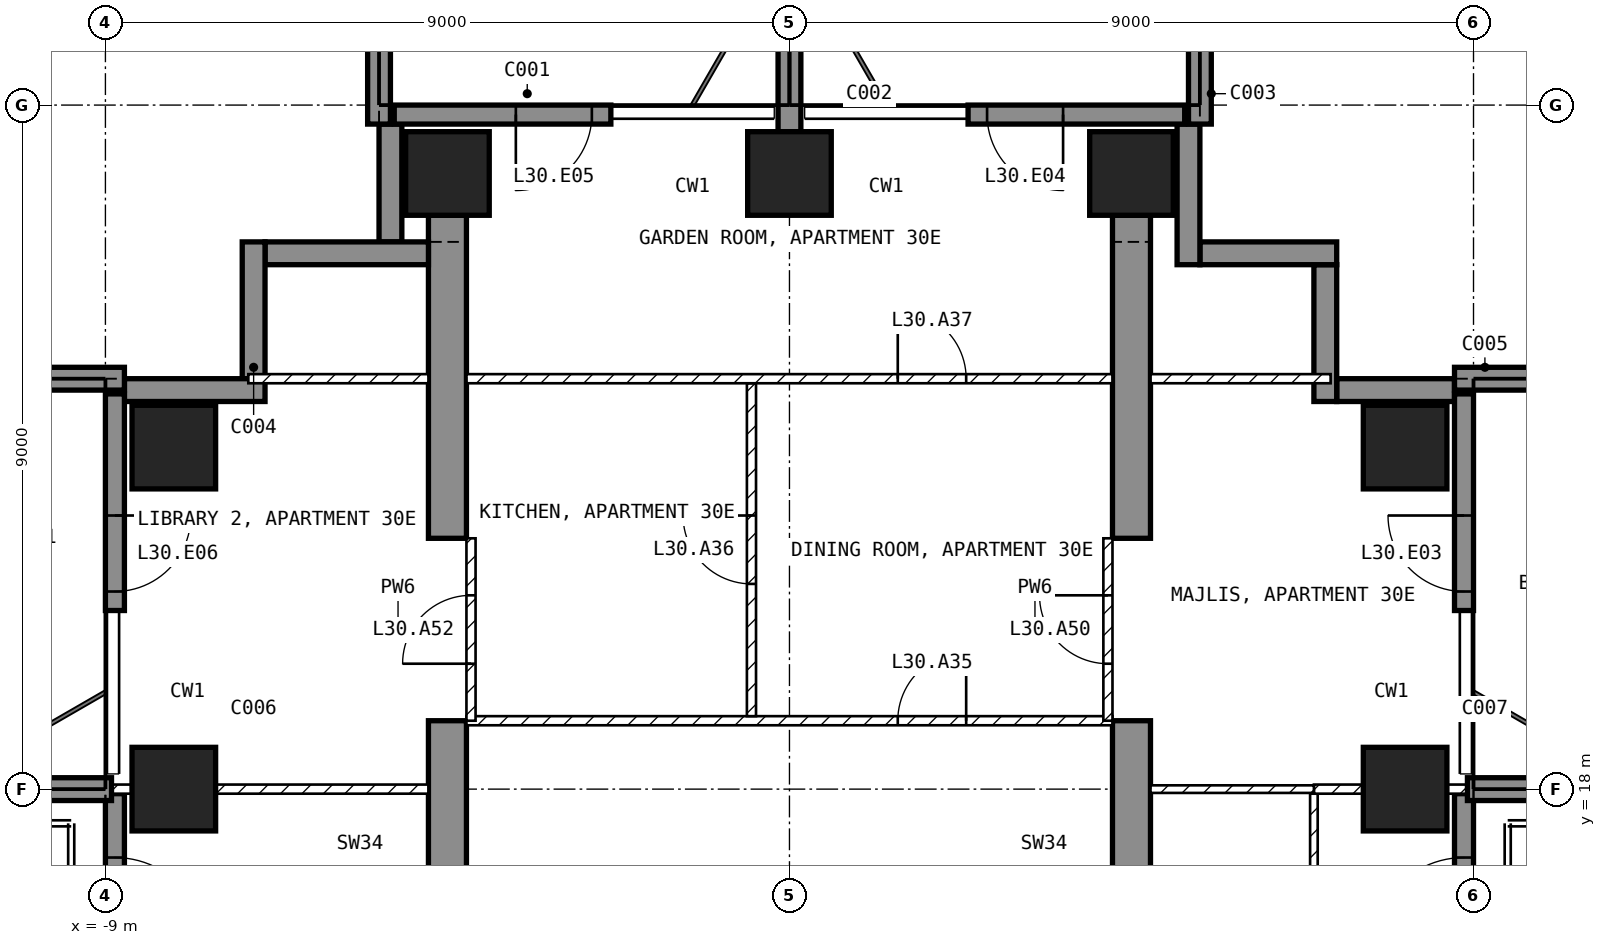
"""IFC4 building model, lengths in metres.
Left out: names, types, materials, properties, quantities, classifications, styles, units other than length and angle.
Written with IfcOpenShell. Run it as: python <this file> out.ifc"""

import sys

from ifc_helpers import new_model, si_unit, direction, frame, frame_2d, origin, origin_2d, place, context, subcontext, project, spatial, polyline, rectangle, outline, extrude, element, fill, save


model = new_model("IFC4")
c1 = context("Model", 3, precision=1e-05, world=origin(), true_north=direction((0.0, 1.0)))
c2 = subcontext(c1, "Body", "Model", "MODEL_VIEW")
j1 = project(units=[si_unit("LENGTHUNIT", "METRE"), si_unit("PLANEANGLEUNIT", "RADIAN")], contexts=[c1])
p1 = place(None, origin())
s1 = spatial("IfcSite", under=j1, at=p1, CompositionType="ELEMENT")
p2 = place(p1, origin())
s2 = spatial("IfcBuilding", under=s1, at=p2, CompositionType="ELEMENT")
p3 = place(p2, frame((0.0, 0.0, 126.9)))
s3 = spatial("IfcBuildingStorey", under=s2, at=p3, CompositionType="ELEMENT", Elevation=126.9)
for number, where, z_axis, x_axis in (
    (1, (-8.1, 18.0, -0.25), (0.0, 0.0, 1.0), (1.0, 0.0, 0.0)),
    (2, (-8.1, 22.5, -0.25), (0.0, 0.0, 1.0), (1.0, 0.0, 0.0)),
    (3, (-4.5, 26.1, -0.25), (0.0, 0.0, 1.0), (1.0, 0.0, 0.0)),
    (4, (0.0, 26.1, -0.25), (0.0, 0.0, 1.0), (1.0, 0.0, 0.0)),
    (5, (4.5, 26.1, -0.25), (0.0, 0.0, 1.0), (1.0, 0.0, 0.0)),
    (6, (8.1, 18.0, -0.25), (0.0, 0.0, 1.0), (1.0, 0.0, 0.0)),
    (7, (8.1, 22.5, -0.25), (0.0, 0.0, 1.0), (1.0, 0.0, 0.0)),
):
    element("IfcColumn", number, at=place(p3, frame(where, z_axis=z_axis, x_axis=x_axis)), inside=s3, PredefinedType="COLUMN", context=c2, shape_type="SweptSolid", body=[
        extrude(rectangle(XDim=1.1, YDim=1.1, at=origin_2d()), origin(), (0.0, 0.0, 1.0), 3.5),
    ])
for number, where, z_axis, x_axis in (
    (8, (-4.75, 9.0, -0.25), (1.0, 0.0, 0.0), (0.0, 1.0, 0.0)),
    (9, (4.25, 9.0, -0.25), (1.0, 0.0, 0.0), (0.0, 1.0, 0.0)),
):
    element("IfcWall", number, at=place(p3, frame(where, z_axis=z_axis, x_axis=x_axis)), inside=s3, PredefinedType="SHEAR", context=c2, shape_type="SweptSolid", body=[
        extrude(outline(polyline([(0.0, 0.0), (2.1, 0.0), (2.1, 2.65), (4.5, 2.65), (4.5, 0.0), (9.9, 0.0), (9.9, 2.65), (12.3, 2.65), (12.3, 0.0), (16.55, 0.0), (16.55, 3.5), (0.0, 3.5), (0.0, 0.0)])), origin(), (0.0, 0.0, 1.0), 0.5),
    ])
p4 = place(p3, frame((8.875, 15.65, 0.0), z_axis=(0.0, 0.0, 1.0), x_axis=(0.0, 1.0, 0.0)))
e10 = element("IfcWall", 10, at=p4, inside=s3, PredefinedType="SOLIDWALL", context=c2, shape_type="SweptSolid", body=[
    extrude(rectangle(XDim=2.29, YDim=0.25, at=frame_2d((1.145, 0.0))), origin(), (0.0, 0.0, 1.0), 3.25),
])
p5 = place(p4, frame((0.25, 0.0, 0.0)))
e11 = element("IfcOpeningElement", 11, at=p5, cuts=e10, PredefinedType="OPENING", context=c2, shape_type="SweptSolid", body=[
    extrude(rectangle(XDim=1.2, YDim=2.4, at=frame_2d((0.6, 1.2))), frame((0.0, 0.135, 0.0), z_axis=(0.0, -1.0, 0.0), x_axis=(1.0, 0.0, 0.0)), (0.0, 0.0, 1.0), 0.27),
])
p6 = place(p3, frame((8.875, 20.35, 0.0), z_axis=(0.0, 0.0, 1.0), x_axis=(0.0, 1.0, 0.0)))
e12 = element("IfcWall", 12, at=p6, inside=s3, PredefinedType="SOLIDWALL", context=c2, shape_type="SweptSolid", body=[
    extrude(rectangle(XDim=2.85, YDim=0.25, at=frame_2d((1.425, 0.0))), origin(), (0.0, 0.0, 1.0), 3.25),
])
p7 = place(p6, frame((0.25, 0.0, 0.0)))
e13 = element("IfcOpeningElement", 13, at=p7, cuts=e12, PredefinedType="OPENING", context=c2, shape_type="SweptSolid", body=[
    extrude(rectangle(XDim=1.0, YDim=2.4, at=frame_2d((0.5, 1.2))), frame((0.0, 0.135, 0.0), z_axis=(0.0, -1.0, 0.0), x_axis=(1.0, 0.0, 0.0)), (0.0, 0.0, 1.0), 0.27),
])
p8 = place(p3, frame((5.2, 26.875, 0.0), z_axis=(0.0, 0.0, 1.0), x_axis=(-1.0, 0.0, 0.0)))
e14 = element("IfcWall", 14, at=p8, inside=s3, PredefinedType="SOLIDWALL", context=c2, shape_type="SweptSolid", body=[
    extrude(rectangle(XDim=2.85, YDim=0.25, at=frame_2d((1.425, 0.0))), origin(), (0.0, 0.0, 1.0), 3.25),
])
p9 = place(p8, frame((1.6, 0.0, 0.0)))
e15 = element("IfcOpeningElement", 15, at=p9, cuts=e14, PredefinedType="OPENING", context=c2, shape_type="SweptSolid", body=[
    extrude(rectangle(XDim=1.0, YDim=2.4, at=frame_2d((0.5, 1.2))), frame((0.0, 0.135, 0.0), z_axis=(0.0, -1.0, 0.0), x_axis=(1.0, 0.0, 0.0)), (0.0, 0.0, 1.0), 0.27),
])
p10 = place(p3, frame((-2.35, 26.875, 0.0), z_axis=(0.0, 0.0, 1.0), x_axis=(-1.0, 0.0, 0.0)))
e16 = element("IfcWall", 16, at=p10, inside=s3, PredefinedType="SOLIDWALL", context=c2, shape_type="SweptSolid", body=[
    extrude(rectangle(XDim=2.85, YDim=0.25, at=frame_2d((1.425, 0.0))), origin(), (0.0, 0.0, 1.0), 3.25),
])
p11 = place(p10, frame((0.25, 0.0, 0.0)))
e17 = element("IfcOpeningElement", 17, at=p11, cuts=e16, PredefinedType="OPENING", context=c2, shape_type="SweptSolid", body=[
    extrude(rectangle(XDim=1.0, YDim=2.4, at=frame_2d((0.5, 1.2))), frame((0.0, 0.135, 0.0), z_axis=(0.0, -1.0, 0.0), x_axis=(1.0, 0.0, 0.0)), (0.0, 0.0, 1.0), 0.27),
])
p12 = place(p3, frame((-8.875, 23.2, 0.0), z_axis=(0.0, 0.0, 1.0), x_axis=(0.0, -1.0, 0.0)))
e18 = element("IfcWall", 18, at=p12, inside=s3, PredefinedType="SOLIDWALL", context=c2, shape_type="SweptSolid", body=[
    extrude(rectangle(XDim=2.85, YDim=0.25, at=frame_2d((1.425, 0.0))), origin(), (0.0, 0.0, 1.0), 3.25),
])
p13 = place(p12, frame((1.6, 0.0, 0.0)))
e19 = element("IfcOpeningElement", 19, at=p13, cuts=e18, PredefinedType="OPENING", context=c2, shape_type="SweptSolid", body=[
    extrude(rectangle(XDim=1.0, YDim=2.4, at=frame_2d((0.5, 1.2))), frame((0.0, 0.135, 0.0), z_axis=(0.0, -1.0, 0.0), x_axis=(1.0, 0.0, 0.0)), (0.0, 0.0, 1.0), 0.27),
])
p14 = place(p3, frame((-8.875, 17.94, 0.0), z_axis=(0.0, 0.0, 1.0), x_axis=(0.0, -1.0, 0.0)))
e20 = element("IfcWall", 20, at=p14, inside=s3, PredefinedType="SOLIDWALL", context=c2, shape_type="SweptSolid", body=[
    extrude(rectangle(XDim=2.29, YDim=0.25, at=frame_2d((1.145, 0.0))), origin(), (0.0, 0.0, 1.0), 3.25),
])
p15 = place(p14, frame((0.84, 0.0, 0.0)))
e21 = element("IfcOpeningElement", 21, at=p15, cuts=e20, PredefinedType="OPENING", context=c2, shape_type="SweptSolid", body=[
    extrude(rectangle(XDim=1.2, YDim=2.4, at=frame_2d((0.6, 1.2))), frame((0.0, 0.135, 0.0), z_axis=(0.0, -1.0, 0.0), x_axis=(1.0, 0.0, 0.0)), (0.0, 0.0, 1.0), 0.27),
])
p16 = place(p3, frame((8.75, 23.25, 0.0), z_axis=(0.0, 0.0, 1.0), x_axis=(-1.0, 0.0, 0.0)))
e22 = element("IfcWall", 22, at=p16, inside=s3, PredefinedType="SOLIDWALL", context=c2, shape_type="SweptSolid", body=[
    extrude(rectangle(XDim=1.55, YDim=0.3, at=frame_2d((0.775, 0.0))), origin(), (0.0, 0.0, 1.0), 3.25),
])
p17 = place(p3, frame((7.05, 23.1, 0.0), z_axis=(0.0, 0.0, 1.0), x_axis=(0.0, 1.0, 0.0)))
e23 = element("IfcWall", 23, at=p17, inside=s3, PredefinedType="SOLIDWALL", context=c2, shape_type="SweptSolid", body=[
    extrude(rectangle(XDim=1.8, YDim=0.3, at=frame_2d((0.9, 0.0))), origin(), (0.0, 0.0, 1.0), 3.25),
])
p18 = place(p3, frame((7.2, 25.05, 0.0), z_axis=(0.0, 0.0, 1.0), x_axis=(-1.0, 0.0, 0.0)))
e24 = element("IfcWall", 24, at=p18, inside=s3, PredefinedType="SOLIDWALL", context=c2, shape_type="SweptSolid", body=[
    extrude(rectangle(XDim=1.8, YDim=0.3, at=frame_2d((0.9, 0.0))), origin(), (0.0, 0.0, 1.0), 3.25),
])
p19 = place(p3, frame((5.25, 24.9, 0.0), z_axis=(0.0, 0.0, 1.0), x_axis=(0.0, 1.0, 0.0)))
e25 = element("IfcWall", 25, at=p19, inside=s3, PredefinedType="SOLIDWALL", context=c2, shape_type="SweptSolid", body=[
    extrude(rectangle(XDim=1.85, YDim=0.3, at=frame_2d((0.925, 0.0))), origin(), (0.0, 0.0, 1.0), 3.25),
])
p20 = place(p3, frame((-5.25, 26.75, 0.0), z_axis=(0.0, 0.0, 1.0), x_axis=(0.0, -1.0, 0.0)))
e26 = element("IfcWall", 26, at=p20, inside=s3, PredefinedType="SOLIDWALL", context=c2, shape_type="SweptSolid", body=[
    extrude(rectangle(XDim=1.55, YDim=0.3, at=frame_2d((0.775, 0.0))), origin(), (0.0, 0.0, 1.0), 3.25),
])
p21 = place(p3, frame((-4.75, 25.05, 0.0), z_axis=(0.0, 0.0, 1.0), x_axis=(-1.0, 0.0, 0.0)))
e27 = element("IfcWall", 27, at=p21, inside=s3, PredefinedType="SOLIDWALL", context=c2, shape_type="SweptSolid", body=[
    extrude(rectangle(XDim=2.15, YDim=0.3, at=frame_2d((1.075, 0.0))), origin(), (0.0, 0.0, 1.0), 3.25),
])
p22 = place(p3, frame((-7.05, 25.2, 0.0), z_axis=(0.0, 0.0, 1.0), x_axis=(0.0, -1.0, 0.0)))
e28 = element("IfcWall", 28, at=p22, inside=s3, PredefinedType="SOLIDWALL", context=c2, shape_type="SweptSolid", body=[
    extrude(rectangle(XDim=1.8, YDim=0.3, at=frame_2d((0.9, 0.0))), origin(), (0.0, 0.0, 1.0), 3.25),
])
p23 = place(p3, frame((-6.9, 23.25, 0.0), z_axis=(0.0, 0.0, 1.0), x_axis=(-1.0, 0.0, 0.0)))
e29 = element("IfcWall", 29, at=p23, inside=s3, PredefinedType="SOLIDWALL", context=c2, shape_type="SweptSolid", body=[
    extrude(rectangle(XDim=1.85, YDim=0.3, at=frame_2d((0.925, 0.0))), origin(), (0.0, 0.0, 1.0), 3.25),
])
p24 = place(p3, frame((-8.92, 18.0, 0.0), z_axis=(0.0, 0.0, 1.0), x_axis=(-1.0, 0.0, 0.0)))
e30 = element("IfcWall", 30, at=p24, inside=s3, PredefinedType="SOLIDWALL", context=c2, shape_type="SweptSolid", body=[
    extrude(rectangle(XDim=2.82, YDim=0.3, at=frame_2d((1.41, 0.0))), origin(), (0.0, 0.0, 1.0), 3.25),
])
for number, where, z_axis, x_axis in (
    (31, (-8.75, 23.4, 0.0), (0.0, 0.0, 1.0), (-1.0, 0.0, 0.0)),
    (32, (-5.4, 26.75, 0.0), (0.0, 0.0, 1.0), (0.0, 1.0, 0.0)),
):
    element("IfcWall", number, at=place(p3, frame(where, z_axis=z_axis, x_axis=x_axis)), inside=s3, PredefinedType="SOLIDWALL", context=c2, shape_type="SweptSolid", body=[
        extrude(rectangle(XDim=2.95, YDim=0.3, at=frame_2d((1.475, 0.0))), origin(), (0.0, 0.0, 1.0), 3.25),
    ])
p25 = place(p3, frame((0.0, 26.65, 0.0), z_axis=(0.0, 0.0, 1.0), x_axis=(0.0, 1.0, 0.0)))
e33 = element("IfcWall", 33, at=p25, inside=s3, PredefinedType="SOLIDWALL", context=c2, shape_type="SweptSolid", body=[
    extrude(rectangle(XDim=3.05, YDim=0.3, at=frame_2d((1.525, 0.0))), origin(), (0.0, 0.0, 1.0), 3.25),
])
p26 = place(p3, frame((5.4, 26.75, 0.0), z_axis=(0.0, 0.0, 1.0), x_axis=(0.0, 1.0, 0.0)))
e34 = element("IfcWall", 34, at=p26, inside=s3, PredefinedType="SOLIDWALL", context=c2, shape_type="SweptSolid", body=[
    extrude(rectangle(XDim=2.95, YDim=0.3, at=frame_2d((1.475, 0.0))), origin(), (0.0, 0.0, 1.0), 3.25),
])
p27 = place(p3, frame((8.92, 18.0, 0.0), z_axis=(0.0, 0.0, 1.0), x_axis=(1.0, 0.0, 0.0)))
e35 = element("IfcWall", 35, at=p27, inside=s3, PredefinedType="SOLIDWALL", context=c2, shape_type="SweptSolid", body=[
    extrude(rectangle(XDim=2.82, YDim=0.3, at=frame_2d((1.41, 0.0))), origin(), (0.0, 0.0, 1.0), 3.25),
])
p28 = place(p3, frame((8.75, 23.4, 0.0), z_axis=(0.0, 0.0, 1.0), x_axis=(1.0, 0.0, 0.0)))
e36 = element("IfcWall", 36, at=p28, inside=s3, PredefinedType="SOLIDWALL", context=c2, shape_type="SweptSolid", body=[
    extrude(rectangle(XDim=2.95, YDim=0.3, at=frame_2d((1.475, 0.0))), origin(), (0.0, 0.0, 1.0), 3.25),
])
p29 = place(p3, frame((-4.25, 18.9, 0.0), z_axis=(0.0, 0.0, 1.0), x_axis=(1.0, 0.0, 0.0)))
e37 = element("IfcWall", 37, at=p29, inside=s3, PredefinedType="PARTITIONING", context=c2, shape_type="SweptSolid", body=[
    extrude(rectangle(XDim=8.5, YDim=0.12, at=frame_2d((4.25, 0.0))), origin(), (0.0, 0.0, 1.0), 3.25),
])
p30 = place(p29, frame((5.675, 0.0, 0.0)))
e38 = element("IfcOpeningElement", 38, at=p30, cuts=e37, PredefinedType="OPENING", context=c2, shape_type="SweptSolid", body=[
    extrude(rectangle(XDim=0.9, YDim=2.1, at=frame_2d((0.45, 1.05))), frame((0.0, 0.07, 0.0), z_axis=(0.0, -1.0, 0.0), x_axis=(1.0, 0.0, 0.0)), (0.0, 0.0, 1.0), 0.14),
])
p31 = place(p3, frame((-0.5, 18.96, 0.0), z_axis=(0.0, 0.0, 1.0), x_axis=(0.0, 1.0, 0.0)))
e39 = element("IfcWall", 39, at=p31, inside=s3, PredefinedType="PARTITIONING", context=c2, shape_type="SweptSolid", body=[
    extrude(rectangle(XDim=4.38, YDim=0.12, at=frame_2d((2.19, 0.0))), origin(), (0.0, 0.0, 1.0), 3.25),
])
p32 = place(p31, frame((1.74, 0.0, 0.0)))
e40 = element("IfcOpeningElement", 40, at=p32, cuts=e39, PredefinedType="OPENING", context=c2, shape_type="SweptSolid", body=[
    extrude(rectangle(XDim=0.9, YDim=2.1, at=frame_2d((0.45, 1.05))), frame((0.0, 0.07, 0.0), z_axis=(0.0, -1.0, 0.0), x_axis=(1.0, 0.0, 0.0)), (0.0, 0.0, 1.0), 0.14),
])
p33 = place(p3, frame((-4.25, 23.4, 0.0), z_axis=(0.0, 0.0, 1.0), x_axis=(1.0, 0.0, 0.0)))
e41 = element("IfcWall", 41, at=p33, inside=s3, PredefinedType="PARTITIONING", context=c2, shape_type="SweptSolid", body=[
    extrude(rectangle(XDim=8.5, YDim=0.12, at=frame_2d((4.25, 0.0))), origin(), (0.0, 0.0, 1.0), 3.25),
])
p34 = place(p33, frame((5.675, 0.0, 0.0)))
e42 = element("IfcOpeningElement", 42, at=p34, cuts=e41, PredefinedType="OPENING", context=c2, shape_type="SweptSolid", body=[
    extrude(rectangle(XDim=0.9, YDim=2.1, at=frame_2d((0.45, 1.05))), frame((0.0, 0.07, 0.0), z_axis=(0.0, -1.0, 0.0), x_axis=(1.0, 0.0, 0.0)), (0.0, 0.0, 1.0), 0.14),
])
p35 = place(p3, frame((6.9, 14.45, 0.0), z_axis=(0.0, 0.0, 1.0), x_axis=(0.0, 1.0, 0.0)))
e43 = element("IfcWall", 43, at=p35, inside=s3, PredefinedType="PARTITIONING", context=c2, shape_type="SweptSolid", body=[
    extrude(rectangle(XDim=3.49, YDim=0.1, at=frame_2d((1.745, 0.0))), origin(), (0.0, 0.0, 1.0), 3.25),
])
p36 = place(p3, frame((6.9, 18.0, 0.0), z_axis=(0.0, 0.0, 1.0), x_axis=(1.0, 0.0, 0.0)))
e44 = element("IfcWall", 44, at=p36, inside=s3, PredefinedType="PARTITIONING", context=c2, shape_type="SweptSolid", body=[
    extrude(rectangle(XDim=2.02, YDim=0.12, at=frame_2d((1.01, 0.0))), origin(), (0.0, 0.0, 1.0), 2.414),
])
p37 = place(p3, frame((4.75, 18.0, 0.0), z_axis=(0.0, 0.0, 1.0), x_axis=(1.0, 0.0, 0.0)))
e45 = element("IfcWall", 45, at=p37, inside=s3, PredefinedType="PARTITIONING", context=c2, shape_type="SweptSolid", body=[
    extrude(rectangle(XDim=2.15, YDim=0.1, at=frame_2d((1.075, 0.0))), origin(), (0.0, 0.0, 1.0), 2.414),
])
p38 = place(p3, frame((4.75, 23.4, 0.0), z_axis=(0.0, 0.0, 1.0), x_axis=(1.0, 0.0, 0.0)))
e46 = element("IfcWall", 46, at=p38, inside=s3, PredefinedType="PARTITIONING", context=c2, shape_type="SweptSolid", body=[
    extrude(rectangle(XDim=2.37, YDim=0.12, at=frame_2d((1.185, 0.0))), origin(), (0.0, 0.0, 1.0), 3.25),
])
p39 = place(p3, frame((-8.92, 18.0, 0.0), z_axis=(0.0, 0.0, 1.0), x_axis=(1.0, 0.0, 0.0)))
e47 = element("IfcWall", 47, at=p39, inside=s3, PredefinedType="PARTITIONING", context=c2, shape_type="SweptSolid", body=[
    extrude(rectangle(XDim=4.17, YDim=0.12, at=frame_2d((2.085, 0.0))), origin(), (0.0, 0.0, 1.0), 2.414),
])
p40 = place(p3, frame((-7.12, 23.4, 0.0), z_axis=(0.0, 0.0, 1.0), x_axis=(1.0, 0.0, 0.0)))
e48 = element("IfcWall", 48, at=p40, inside=s3, PredefinedType="PARTITIONING", context=c2, shape_type="SweptSolid", body=[
    extrude(rectangle(XDim=2.37, YDim=0.12, at=frame_2d((1.185, 0.0))), origin(), (0.0, 0.0, 1.0), 3.25),
])
p41 = place(p3, frame((4.19, 18.9, 0.0), z_axis=(0.0, 0.0, 1.0), x_axis=(0.0, 1.0, 0.0)))
e49 = element("IfcWall", 49, at=p41, inside=s3, PredefinedType="PARTITIONING", context=c2, shape_type="SweptSolid", body=[
    extrude(rectangle(XDim=2.4, YDim=0.12, at=frame_2d((1.2, 0.0))), origin(), (0.0, 0.0, 1.0), 2.4),
])
p42 = place(p41, frame((0.75, 0.0, 0.0)))
e50 = element("IfcOpeningElement", 50, at=p42, cuts=e49, PredefinedType="OPENING", context=c2, shape_type="SweptSolid", body=[
    extrude(rectangle(XDim=0.9, YDim=2.1, at=frame_2d((0.45, 1.05))), frame((0.0, 0.07, 0.0), z_axis=(0.0, -1.0, 0.0), x_axis=(1.0, 0.0, 0.0)), (0.0, 0.0, 1.0), 0.14),
])
p43 = place(p3, frame((-4.19, 18.9, 0.0), z_axis=(0.0, 0.0, 1.0), x_axis=(0.0, 1.0, 0.0)))
e51 = element("IfcWall", 51, at=p43, inside=s3, PredefinedType="PARTITIONING", context=c2, shape_type="SweptSolid", body=[
    extrude(rectangle(XDim=2.4, YDim=0.12, at=frame_2d((1.2, 0.0))), origin(), (0.0, 0.0, 1.0), 2.4),
])
p44 = place(p43, frame((0.75, 0.0, 0.0)))
e52 = element("IfcOpeningElement", 52, at=p44, cuts=e51, PredefinedType="OPENING", context=c2, shape_type="SweptSolid", body=[
    extrude(rectangle(XDim=0.9, YDim=2.1, at=frame_2d((0.45, 1.05))), frame((0.0, 0.07, 0.0), z_axis=(0.0, -1.0, 0.0), x_axis=(1.0, 0.0, 0.0)), (0.0, 0.0, 1.0), 0.14),
])
p45 = place(p5, origin())
e53 = element("IfcDoor", 53, at=p45, inside=s3, OperationType="SINGLE_SWING_LEFT", PredefinedType="DOOR", context=c2, shape_type="SweptSolid", body=[
    extrude(rectangle(XDim=1.2, YDim=2.4, at=frame_2d((0.6, 1.2))), frame((0.0, 0.025, 0.0), z_axis=(0.0, -1.0, 0.0), x_axis=(1.0, 0.0, 0.0)), (0.0, 0.0, 1.0), 0.05),
])
fill(e11, e53)
p46 = place(p7, origin())
e54 = element("IfcDoor", 54, at=p46, inside=s3, OperationType="SINGLE_SWING_RIGHT", PredefinedType="DOOR", context=c2, shape_type="SweptSolid", body=[
    extrude(rectangle(XDim=1.0, YDim=2.4, at=frame_2d((0.5, 1.2))), frame((0.0, 0.025, 0.0), z_axis=(0.0, -1.0, 0.0), x_axis=(1.0, 0.0, 0.0)), (0.0, 0.0, 1.0), 0.05),
])
fill(e13, e54)
p47 = place(p9, origin())
e55 = element("IfcDoor", 55, at=p47, inside=s3, OperationType="SINGLE_SWING_LEFT", PredefinedType="DOOR", context=c2, shape_type="SweptSolid", body=[
    extrude(rectangle(XDim=1.0, YDim=2.4, at=frame_2d((0.5, 1.2))), frame((0.0, 0.025, 0.0), z_axis=(0.0, -1.0, 0.0), x_axis=(1.0, 0.0, 0.0)), (0.0, 0.0, 1.0), 0.05),
])
fill(e15, e55)
p48 = place(p11, origin())
e56 = element("IfcDoor", 56, at=p48, inside=s3, OperationType="SINGLE_SWING_RIGHT", PredefinedType="DOOR", context=c2, shape_type="SweptSolid", body=[
    extrude(rectangle(XDim=1.0, YDim=2.4, at=frame_2d((0.5, 1.2))), frame((0.0, 0.025, 0.0), z_axis=(0.0, -1.0, 0.0), x_axis=(1.0, 0.0, 0.0)), (0.0, 0.0, 1.0), 0.05),
])
fill(e17, e56)
p49 = place(p13, origin())
e57 = element("IfcDoor", 57, at=p49, inside=s3, OperationType="SINGLE_SWING_LEFT", PredefinedType="DOOR", context=c2, shape_type="SweptSolid", body=[
    extrude(rectangle(XDim=1.0, YDim=2.4, at=frame_2d((0.5, 1.2))), frame((0.0, 0.025, 0.0), z_axis=(0.0, -1.0, 0.0), x_axis=(1.0, 0.0, 0.0)), (0.0, 0.0, 1.0), 0.05),
])
fill(e19, e57)
p50 = place(p15, origin())
e58 = element("IfcDoor", 58, at=p50, inside=s3, OperationType="SINGLE_SWING_RIGHT", PredefinedType="DOOR", context=c2, shape_type="SweptSolid", body=[
    extrude(rectangle(XDim=1.2, YDim=2.4, at=frame_2d((0.6, 1.2))), frame((0.0, 0.025, 0.0), z_axis=(0.0, -1.0, 0.0), x_axis=(1.0, 0.0, 0.0)), (0.0, 0.0, 1.0), 0.05),
])
fill(e21, e58)
p51 = place(p30, origin())
e59 = element("IfcDoor", 59, at=p51, inside=s3, OperationType="SINGLE_SWING_RIGHT", PredefinedType="DOOR", context=c2, shape_type="SweptSolid", body=[
    extrude(rectangle(XDim=0.9, YDim=2.1, at=frame_2d((0.45, 1.05))), frame((0.0, 0.025, 0.0), z_axis=(0.0, -1.0, 0.0), x_axis=(1.0, 0.0, 0.0)), (0.0, 0.0, 1.0), 0.05),
])
fill(e38, e59)
p52 = place(p32, origin())
e60 = element("IfcDoor", 60, at=p52, inside=s3, OperationType="SINGLE_SWING_RIGHT", PredefinedType="DOOR", context=c2, shape_type="SweptSolid", body=[
    extrude(rectangle(XDim=0.9, YDim=2.1, at=frame_2d((0.45, 1.05))), frame((0.0, 0.025, 0.0), z_axis=(0.0, -1.0, 0.0), x_axis=(1.0, 0.0, 0.0)), (0.0, 0.0, 1.0), 0.05),
])
fill(e40, e60)
p53 = place(p34, origin())
e61 = element("IfcDoor", 61, at=p53, inside=s3, OperationType="SINGLE_SWING_LEFT", PredefinedType="DOOR", context=c2, shape_type="SweptSolid", body=[
    extrude(rectangle(XDim=0.9, YDim=2.1, at=frame_2d((0.45, 1.05))), frame((0.0, 0.025, 0.0), z_axis=(0.0, -1.0, 0.0), x_axis=(1.0, 0.0, 0.0)), (0.0, 0.0, 1.0), 0.05),
])
fill(e42, e61)
p54 = place(p42, origin())
e62 = element("IfcDoor", 62, at=p54, inside=s3, OperationType="SINGLE_SWING_RIGHT", PredefinedType="DOOR", context=c2, shape_type="SweptSolid", body=[
    extrude(rectangle(XDim=0.9, YDim=2.1, at=frame_2d((0.45, 1.05))), frame((0.0, 0.025, 0.0), z_axis=(0.0, -1.0, 0.0), x_axis=(1.0, 0.0, 0.0)), (0.0, 0.0, 1.0), 0.05),
])
fill(e50, e62)
p55 = place(p44, origin())
e63 = element("IfcDoor", 63, at=p55, inside=s3, OperationType="SINGLE_SWING_LEFT", PredefinedType="DOOR", context=c2, shape_type="SweptSolid", body=[
    extrude(rectangle(XDim=0.9, YDim=2.1, at=frame_2d((0.45, 1.05))), frame((0.0, 0.025, 0.0), z_axis=(0.0, -1.0, 0.0), x_axis=(1.0, 0.0, 0.0)), (0.0, 0.0, 1.0), 0.05),
])
fill(e52, e63)
save(model, sys.argv[1])
